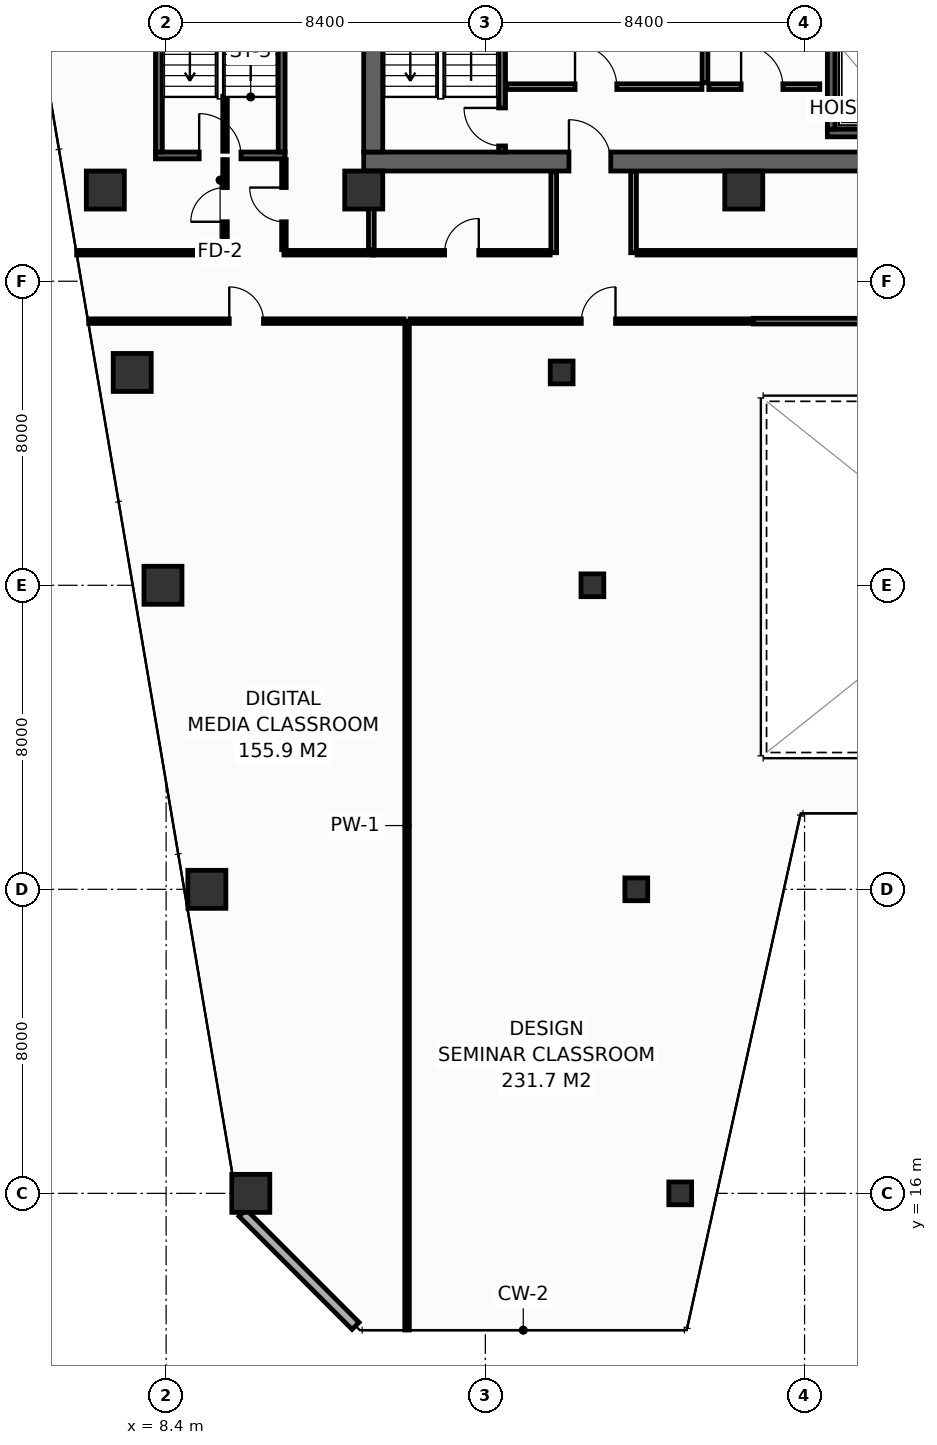
"""IFC4 building model, lengths in metres.
Left out: names, types, materials, properties, quantities, classifications, styles, units other than length and angle.
Written with IfcOpenShell. Run it as: python <this file> out.ifc"""

import sys

from ifc_helpers import new_model, si_unit, direction, frame, frame_2d, origin, origin_2d, place, context, subcontext, project, spatial, rectangle, hollow_rectangle, extrude, element, fill, save


model = new_model("IFC4")
c1 = context("Model", 3, precision=1e-05, world=origin(), true_north=direction((0.0, 1.0)))
c2 = subcontext(c1, "Body", "Model", "MODEL_VIEW")
j1 = project(units=[si_unit("LENGTHUNIT", "METRE"), si_unit("PLANEANGLEUNIT", "RADIAN")], contexts=[c1])
p1 = place(None, origin())
s1 = spatial("IfcSite", under=j1, at=p1, CompositionType="ELEMENT")
p2 = place(p1, origin())
s2 = spatial("IfcBuilding", under=s1, at=p2, CompositionType="ELEMENT")
p3 = place(p2, frame((0.0, 0.0, 175.2)))
s3 = spatial("IfcBuildingStorey", under=s2, at=p3, CompositionType="ELEMENT", Elevation=175.2)
p4 = place(p3, frame((13.6, 43.15, 0.0), z_axis=(0.0, 0.0, 1.0), x_axis=(1.0, 0.0, 0.0)))
e1 = element("IfcWall", 1, at=p4, inside=s3, PredefinedType="SHEAR", context=c2, shape_type="SweptSolid", body=[
    extrude(rectangle(XDim=32.7, YDim=0.5, at=frame_2d((16.35, 0.0))), origin(), (0.0, 0.0, 1.0), 3.55),
])
p5 = place(p4, frame((5.4, 0.0, 0.0)))
e2 = element("IfcOpeningElement", 2, at=p5, cuts=e1, PredefinedType="OPENING", context=c2, shape_type="SweptSolid", body=[
    extrude(rectangle(XDim=1.1, YDim=2.15, at=frame_2d((0.55, 1.075))), frame((0.0, 0.26, 0.0), z_axis=(0.0, -1.0, 0.0), x_axis=(1.0, 0.0, 0.0)), (0.0, 0.0, 1.0), 0.52),
])
p6 = place(p4, frame((25.6, 0.0, 0.0)))
e3 = element("IfcOpeningElement", 3, at=p6, cuts=e1, PredefinedType="OPENING", context=c2, shape_type="SweptSolid", body=[
    extrude(rectangle(XDim=1.1, YDim=2.15, at=frame_2d((0.55, 1.075))), frame((0.0, 0.26, 0.0), z_axis=(0.0, -1.0, 0.0), x_axis=(1.0, 0.0, 0.0)), (0.0, 0.0, 1.0), 0.52),
])
p7 = place(p3, frame((13.85, 43.4, 0.0), z_axis=(0.0, 0.0, 1.0), x_axis=(0.0, 1.0, 0.0)))
e4 = element("IfcWall", 4, at=p7, inside=s3, PredefinedType="SHEAR", context=c2, shape_type="SweptSolid", body=[
    extrude(rectangle(XDim=10.4, YDim=0.5, at=frame_2d((5.2, 0.0))), origin(), (0.0, 0.0, 1.0), 3.55),
])
for number, where, z_axis, x_axis in (
    (5, (6.8, 42.4, 0.0), (0.0, 0.0, 1.0), (1.0, 0.0, 0.0)),
    (6, (13.6, 42.4, 0.0), (0.0, 0.0, 1.0), (1.0, 0.0, 0.0)),
    (7, (23.6, 42.4, 0.0), (0.0, 0.0, 1.0), (1.0, 0.0, 0.0)),
    (8, (10.628, 16.0, 0.0), (0.0, 0.0, 1.0), (1.0, 0.0, 0.0)),
):
    element("IfcColumn", number, at=place(p3, frame(where, z_axis=z_axis, x_axis=x_axis)), inside=s3, PredefinedType="COLUMN", context=c2, shape_type="SweptSolid", body=[
        extrude(hollow_rectangle(XDim=1.0, YDim=1.0, WallThickness=0.045, at=origin_2d()), origin(), (0.0, 0.0, 1.0), 3.8),
    ])
p8 = place(p3, frame((21.928, 16.0, 0.0), z_axis=(0.0, 0.0, 1.0), x_axis=(1.0, 0.0, 0.0)))
e9 = element("IfcColumn", 9, at=p8, inside=s3, PredefinedType="COLUMN", context=c2, shape_type="SweptSolid", body=[
    extrude(hollow_rectangle(XDim=0.6, YDim=0.6, WallThickness=0.028, at=origin_2d()), origin(), (0.0, 0.0, 1.0), 3.8),
])
p9 = place(p3, frame((9.472, 24.0, 0.0), z_axis=(0.0, 0.0, 1.0), x_axis=(1.0, 0.0, 0.0)))
e10 = element("IfcColumn", 10, at=p9, inside=s3, PredefinedType="COLUMN", context=c2, shape_type="SweptSolid", body=[
    extrude(hollow_rectangle(XDim=1.0, YDim=1.0, WallThickness=0.045, at=origin_2d()), origin(), (0.0, 0.0, 1.0), 3.8),
])
p10 = place(p3, frame((20.772, 24.0, 0.0), z_axis=(0.0, 0.0, 1.0), x_axis=(1.0, 0.0, 0.0)))
e11 = element("IfcColumn", 11, at=p10, inside=s3, PredefinedType="COLUMN", context=c2, shape_type="SweptSolid", body=[
    extrude(hollow_rectangle(XDim=0.6, YDim=0.6, WallThickness=0.028, at=origin_2d()), origin(), (0.0, 0.0, 1.0), 3.8),
])
p11 = place(p3, frame((8.317, 32.0, 0.0), z_axis=(0.0, 0.0, 1.0), x_axis=(1.0, 0.0, 0.0)))
e12 = element("IfcColumn", 12, at=p11, inside=s3, PredefinedType="COLUMN", context=c2, shape_type="SweptSolid", body=[
    extrude(hollow_rectangle(XDim=1.0, YDim=1.0, WallThickness=0.045, at=origin_2d()), origin(), (0.0, 0.0, 1.0), 3.8),
])
p12 = place(p3, frame((19.617, 32.0, 0.0), z_axis=(0.0, 0.0, 1.0), x_axis=(1.0, 0.0, 0.0)))
e13 = element("IfcColumn", 13, at=p12, inside=s3, PredefinedType="COLUMN", context=c2, shape_type="SweptSolid", body=[
    extrude(hollow_rectangle(XDim=0.6, YDim=0.6, WallThickness=0.028, at=origin_2d()), origin(), (0.0, 0.0, 1.0), 3.8),
])
p13 = place(p3, frame((7.508, 37.6, 0.0), z_axis=(0.0, 0.0, 1.0), x_axis=(1.0, 0.0, 0.0)))
e14 = element("IfcColumn", 14, at=p13, inside=s3, PredefinedType="COLUMN", context=c2, shape_type="SweptSolid", body=[
    extrude(hollow_rectangle(XDim=1.0, YDim=1.0, WallThickness=0.045, at=origin_2d()), origin(), (0.0, 0.0, 1.0), 3.8),
])
p14 = place(p3, frame((18.808, 37.6, 0.0), z_axis=(0.0, 0.0, 1.0), x_axis=(1.0, 0.0, 0.0)))
e15 = element("IfcColumn", 15, at=p14, inside=s3, PredefinedType="COLUMN", context=c2, shape_type="SweptSolid", body=[
    extrude(hollow_rectangle(XDim=0.6, YDim=0.6, WallThickness=0.028, at=origin_2d()), origin(), (0.0, 0.0, 1.0), 3.8),
])
p15 = place(p3, frame((25.8, 43.9, 0.0), z_axis=(0.0, 0.0, 1.0), x_axis=(1.0, 0.0, 0.0)))
e16 = element("IfcWall", 16, at=p15, inside=s3, PredefinedType="SHEAR", context=c2, shape_type="SweptSolid", body=[
    extrude(rectangle(XDim=2.575, YDim=0.2, at=frame_2d((1.288, 0.0))), origin(), (0.0, 0.0, 1.0), 3.55),
])
p16 = place(p3, frame((25.9, 44.0, 0.0), z_axis=(0.0, 0.0, 1.0), x_axis=(0.0, 1.0, 0.0)))
e17 = element("IfcWall", 17, at=p16, inside=s3, PredefinedType="SHEAR", context=c2, shape_type="SweptSolid", body=[
    extrude(rectangle(XDim=2.3, YDim=0.2, at=frame_2d((1.15, 0.0))), origin(), (0.0, 0.0, 1.0), 3.55),
])
p17 = place(p3, frame((17.24, 43.4, 0.0), z_axis=(0.0, 0.0, 1.0), x_axis=(0.0, 1.0, 0.0)))
e18 = element("IfcWall", 18, at=p17, inside=s3, PredefinedType="SHEAR", context=c2, shape_type="SweptSolid", body=[
    extrude(rectangle(XDim=10.4, YDim=0.18, at=frame_2d((5.2, 0.0))), origin(), (0.0, 0.0, 1.0), 3.55),
])
p18 = place(p17, frame((0.16, 0.0, 0.0)))
e19 = element("IfcOpeningElement", 19, at=p18, cuts=e18, PredefinedType="OPENING", context=c2, shape_type="SweptSolid", body=[
    extrude(rectangle(XDim=1.0, YDim=2.15, at=frame_2d((0.5, 1.075))), frame((0.0, 0.1, 0.0), z_axis=(0.0, -1.0, 0.0), x_axis=(1.0, 0.0, 0.0)), (0.0, 0.0, 1.0), 0.2),
])
p19 = place(p3, frame((8.12, 43.31, 0.0), z_axis=(0.0, 0.0, 1.0), x_axis=(1.0, 0.0, 0.0)))
e20 = element("IfcWall", 20, at=p19, inside=s3, PredefinedType="SHEAR", context=c2, shape_type="SweptSolid", body=[
    extrude(rectangle(XDim=3.41, YDim=0.18, at=frame_2d((1.705, 0.0))), origin(), (0.0, 0.0, 1.0), 3.55),
])
p20 = place(p19, frame((1.15, 0.0, 0.0)))
e21 = element("IfcOpeningElement", 21, at=p20, cuts=e20, PredefinedType="OPENING", context=c2, shape_type="SweptSolid", body=[
    extrude(rectangle(XDim=1.1, YDim=2.15, at=frame_2d((0.55, 1.075))), frame((0.0, 0.1, 0.0), z_axis=(0.0, -1.0, 0.0), x_axis=(1.0, 0.0, 0.0)), (0.0, 0.0, 1.0), 0.2),
])
for number, where, z_axis, x_axis in (
    (22, (11.44, 43.4, 0.0), (0.0, 0.0, 1.0), (0.0, 1.0, 0.0)),
    (23, (8.21, 53.8, 0.0), (0.0, 0.0, 1.0), (0.0, -1.0, 0.0)),
):
    element("IfcWall", number, at=place(p3, frame(where, z_axis=z_axis, x_axis=x_axis)), inside=s3, PredefinedType="SHEAR", context=c2, shape_type="SweptSolid", body=[
        extrude(rectangle(XDim=10.4, YDim=0.18, at=frame_2d((5.2, 0.0))), origin(), (0.0, 0.0, 1.0), 3.55),
    ])
p21 = place(p3, frame((17.36, 45.12, 0.0), z_axis=(0.0, 0.0, 1.0), x_axis=(1.0, 0.0, 0.0)))
e24 = element("IfcWall", 24, at=p21, inside=s3, PredefinedType="PARTITIONING", context=c2, shape_type="SweptSolid", body=[
    extrude(rectangle(XDim=5.14, YDim=0.15, at=frame_2d((2.57, 0.0))), origin(), (0.0, 0.0, 1.0), 3.55),
])
p22 = place(p21, frame((1.8, 0.0, 0.0)))
e25 = element("IfcOpeningElement", 25, at=p22, cuts=e24, PredefinedType="OPENING", context=c2, shape_type="SweptSolid", body=[
    extrude(rectangle(XDim=1.1, YDim=2.15, at=frame_2d((0.55, 1.075))), frame((0.0, 0.085, 0.0), z_axis=(0.0, -1.0, 0.0), x_axis=(1.0, 0.0, 0.0)), (0.0, 0.0, 1.0), 0.17),
])
p23 = place(p3, frame((22.58, 50.55, 0.0), z_axis=(0.0, 0.0, 1.0), x_axis=(0.0, -1.0, 0.0)))
e26 = element("IfcWall", 26, at=p23, inside=s3, PredefinedType="PARTITIONING", context=c2, shape_type="SweptSolid", body=[
    extrude(rectangle(XDim=5.33, YDim=0.15, at=frame_2d((2.665, 0.0))), origin(), (0.0, 0.0, 1.0), 3.55),
])
p24 = place(p23, frame((1.8, 0.0, 0.0)))
e27 = element("IfcOpeningElement", 27, at=p24, cuts=e26, PredefinedType="OPENING", context=c2, shape_type="SweptSolid", body=[
    extrude(rectangle(XDim=1.1, YDim=2.15, at=frame_2d((0.55, 1.075))), frame((0.0, 0.085, 0.0), z_axis=(0.0, -1.0, 0.0), x_axis=(1.0, 0.0, 0.0)), (0.0, 0.0, 1.0), 0.17),
])
p25 = place(p3, frame((22.68, 45.12, 0.0), z_axis=(0.0, 0.0, 1.0), x_axis=(1.0, 0.0, 0.0)))
e28 = element("IfcWall", 28, at=p25, inside=s3, PredefinedType="PARTITIONING", context=c2, shape_type="SweptSolid", body=[
    extrude(rectangle(XDim=2.92, YDim=0.15, at=frame_2d((1.46, 0.0))), origin(), (0.0, 0.0, 1.0), 3.55),
])
p26 = place(p25, frame((0.85, 0.0, 0.0)))
e29 = element("IfcOpeningElement", 29, at=p26, cuts=e28, PredefinedType="OPENING", context=c2, shape_type="SweptSolid", body=[
    extrude(rectangle(XDim=1.1, YDim=2.15, at=frame_2d((0.55, 1.075))), frame((0.0, 0.085, 0.0), z_axis=(0.0, -1.0, 0.0), x_axis=(1.0, 0.0, 0.0)), (0.0, 0.0, 1.0), 0.17),
])
p27 = place(p3, frame((10.411, 15.487, 0.0), z_axis=(0.0, 0.0, 1.0), x_axis=(0.707135806771, -0.70707775441, 0.0)))
e30 = element("IfcWall", 30, at=p27, inside=s3, PredefinedType="STANDARD", context=c2, shape_type="SweptSolid", body=[
    extrude(rectangle(XDim=4.206, YDim=0.26, at=frame_2d((2.103, 0.0))), origin(), (0.0, 0.0, 1.0), 3.55),
])
p28 = place(p3, frame((6.045, 40.75, 0.0), z_axis=(0.0, 0.0, 1.0), x_axis=(1.0, 0.0, 0.0)))
e31 = element("IfcWall", 31, at=p28, inside=s3, PredefinedType="PARTITIONING", context=c2, shape_type="SweptSolid", body=[
    extrude(rectangle(XDim=3.905, YDim=0.12, at=frame_2d((1.952, 0.0))), origin(), (0.0, 0.0, 1.0), 3.035),
])
p29 = place(p3, frame((11.5, 40.75, 0.0), z_axis=(0.0, 0.0, 1.0), x_axis=(1.0, 0.0, 0.0)))
e32 = element("IfcWall", 32, at=p29, inside=s3, PredefinedType="PARTITIONING", context=c2, shape_type="SweptSolid", body=[
    extrude(rectangle(XDim=2.35, YDim=0.12, at=frame_2d((1.175, 0.0))), origin(), (0.0, 0.0, 1.0), 3.55),
])
p30 = place(p3, frame((9.95, 40.83, 0.0), z_axis=(0.0, 0.0, 1.0), x_axis=(0.0, 1.0, 0.0)))
e33 = element("IfcWall", 33, at=p30, inside=s3, PredefinedType="PARTITIONING", context=c2, shape_type="SweptSolid", body=[
    extrude(rectangle(XDim=2.37, YDim=0.12, at=frame_2d((1.185, 0.0))), origin(), (0.0, 0.0, 1.0), 2.835),
])
p31 = place(p30, frame((0.735, 0.0, 0.0)))
e34 = element("IfcOpeningElement", 34, at=p31, cuts=e33, PredefinedType="OPENING", context=c2, shape_type="SweptSolid", body=[
    extrude(rectangle(XDim=0.9, YDim=2.1, at=frame_2d((0.45, 1.05))), frame((0.0, 0.07, 0.0), z_axis=(0.0, -1.0, 0.0), x_axis=(1.0, 0.0, 0.0)), (0.0, 0.0, 1.0), 0.14),
])
p32 = place(p3, frame((9.95, 43.42, 0.0), z_axis=(0.0, 0.0, 1.0), x_axis=(0.0, 1.0, 0.0)))
e35 = element("IfcWall", 35, at=p32, inside=s3, PredefinedType="PARTITIONING", context=c2, shape_type="SweptSolid", body=[
    extrude(rectangle(XDim=1.45, YDim=0.12, at=frame_2d((0.725, 0.0))), origin(), (0.0, 0.0, 1.0), 3.55),
])
p33 = place(p3, frame((11.5, 40.83, 0.0), z_axis=(0.0, 0.0, 1.0), x_axis=(0.0, 1.0, 0.0)))
e36 = element("IfcWall", 36, at=p33, inside=s3, PredefinedType="PARTITIONING", context=c2, shape_type="SweptSolid", body=[
    extrude(rectangle(XDim=2.37, YDim=0.12, at=frame_2d((1.185, 0.0))), origin(), (0.0, 0.0, 1.0), 2.835),
])
p34 = place(p33, frame((0.735, 0.0, 0.0)))
e37 = element("IfcOpeningElement", 37, at=p34, cuts=e36, PredefinedType="OPENING", context=c2, shape_type="SweptSolid", body=[
    extrude(rectangle(XDim=0.9, YDim=2.1, at=frame_2d((0.45, 1.05))), frame((0.0, 0.07, 0.0), z_axis=(0.0, -1.0, 0.0), x_axis=(1.0, 0.0, 0.0)), (0.0, 0.0, 1.0), 0.14),
])
p35 = place(p3, frame((13.8, 40.83, 0.0), z_axis=(0.0, 0.0, 1.0), x_axis=(0.0, 1.0, 0.0)))
e38 = element("IfcWall", 38, at=p35, inside=s3, PredefinedType="PARTITIONING", context=c2, shape_type="SweptSolid", body=[
    extrude(rectangle(XDim=2.05, YDim=0.15, at=frame_2d((1.025, 0.0))), origin(), (0.0, 0.0, 1.0), 3.55),
])
for number, where, z_axis, x_axis in (
    (39, (18.6, 40.75, 0.0), (0.0, 0.0, 1.0), (0.0, 1.0, 0.0)),
    (40, (20.7, 40.75, 0.0), (0.0, 0.0, 1.0), (0.0, 1.0, 0.0)),
):
    element("IfcWall", number, at=place(p3, frame(where, z_axis=z_axis, x_axis=x_axis)), inside=s3, PredefinedType="PARTITIONING", context=c2, shape_type="SweptSolid", body=[
        extrude(rectangle(XDim=2.13, YDim=0.15, at=frame_2d((1.065, 0.0))), origin(), (0.0, 0.0, 1.0), 3.55),
    ])
p36 = place(p3, frame((13.85, 40.75, 0.0), z_axis=(0.0, 0.0, 1.0), x_axis=(1.0, 0.0, 0.0)))
e41 = element("IfcWall", 41, at=p36, inside=s3, PredefinedType="PARTITIONING", context=c2, shape_type="SweptSolid", body=[
    extrude(rectangle(XDim=4.655, YDim=0.12, at=frame_2d((2.327, 0.0))), origin(), (0.0, 0.0, 1.0), 3.55),
])
p37 = place(p36, frame((1.877, 0.0, 0.0)))
e42 = element("IfcOpeningElement", 42, at=p37, cuts=e41, PredefinedType="OPENING", context=c2, shape_type="SweptSolid", body=[
    extrude(rectangle(XDim=0.9, YDim=2.1, at=frame_2d((0.45, 1.05))), frame((0.0, 0.07, 0.0), z_axis=(0.0, -1.0, 0.0), x_axis=(1.0, 0.0, 0.0)), (0.0, 0.0, 1.0), 0.14),
])
p38 = place(p3, frame((20.795, 40.75, 0.0), z_axis=(0.0, 0.0, 1.0), x_axis=(1.0, 0.0, 0.0)))
e43 = element("IfcWall", 43, at=p38, inside=s3, PredefinedType="PARTITIONING", context=c2, shape_type="SweptSolid", body=[
    extrude(rectangle(XDim=17.91, YDim=0.12, at=frame_2d((8.955, 0.0))), origin(), (0.0, 0.0, 1.0), 2.835),
])
p39 = place(p38, frame((8.505, 0.0, 0.0)))
e44 = element("IfcOpeningElement", 44, at=p39, cuts=e43, PredefinedType="OPENING", context=c2, shape_type="SweptSolid", body=[
    extrude(rectangle(XDim=0.9, YDim=2.1, at=frame_2d((0.45, 1.05))), frame((0.0, 0.07, 0.0), z_axis=(0.0, -1.0, 0.0), x_axis=(1.0, 0.0, 0.0)), (0.0, 0.0, 1.0), 0.14),
])
p40 = place(p3, frame((14.74, 12.405, 0.0), z_axis=(0.0, 0.0, 1.0), x_axis=(0.0, 1.0, 0.0)))
e45 = element("IfcWall", 45, at=p40, inside=s3, PredefinedType="PARTITIONING", context=c2, shape_type="SweptSolid", body=[
    extrude(rectangle(XDim=26.545, YDim=0.12, at=frame_2d((13.272, 0.0))), origin(), (0.0, 0.0, 1.0), 2.835),
])
p41 = place(p3, frame((6.363, 38.95, 0.0), z_axis=(0.0, 0.0, 1.0), x_axis=(1.0, 0.0, 0.0)))
e46 = element("IfcWall", 46, at=p41, inside=s3, PredefinedType="PARTITIONING", context=c2, shape_type="SweptSolid", body=[
    extrude(rectangle(XDim=8.297, YDim=0.12, at=frame_2d((4.148, 0.0))), origin(), (0.0, 0.0, 1.0), 3.035),
])
p42 = place(p41, frame((3.699, 0.0, 0.0)))
e47 = element("IfcOpeningElement", 47, at=p42, cuts=e46, PredefinedType="OPENING", context=c2, shape_type="SweptSolid", body=[
    extrude(rectangle(XDim=0.9, YDim=2.1, at=frame_2d((0.45, 1.05))), frame((0.0, 0.07, 0.0), z_axis=(0.0, -1.0, 0.0), x_axis=(1.0, 0.0, 0.0)), (0.0, 0.0, 1.0), 0.14),
])
p43 = place(p3, frame((14.82, 38.95, 0.0), z_axis=(0.0, 0.0, 1.0), x_axis=(1.0, 0.0, 0.0)))
e48 = element("IfcWall", 48, at=p43, inside=s3, PredefinedType="PARTITIONING", context=c2, shape_type="SweptSolid", body=[
    extrude(rectangle(XDim=9.03, YDim=0.12, at=frame_2d((4.515, 0.0))), origin(), (0.0, 0.0, 1.0), 2.835),
])
p44 = place(p43, frame((4.505, 0.0, 0.0)))
e49 = element("IfcOpeningElement", 49, at=p44, cuts=e48, PredefinedType="OPENING", context=c2, shape_type="SweptSolid", body=[
    extrude(rectangle(XDim=0.9, YDim=2.1, at=frame_2d((0.45, 1.05))), frame((0.0, 0.07, 0.0), z_axis=(0.0, -1.0, 0.0), x_axis=(1.0, 0.0, 0.0)), (0.0, 0.0, 1.0), 0.14),
])
p45 = place(p3, frame((23.85, 38.95, 0.0), z_axis=(0.0, 0.0, 1.0), x_axis=(1.0, 0.0, 0.0)))
e50 = element("IfcWall", 50, at=p45, inside=s3, PredefinedType="PARTITIONING", context=c2, shape_type="SweptSolid", body=[
    extrude(rectangle(XDim=12.3, YDim=0.15, at=frame_2d((6.15, 0.0))), origin(), (0.0, 0.0, 1.0), 3.55),
])
p46 = place(p18, origin())
e51 = element("IfcDoor", 51, at=p46, inside=s3, OperationType="SINGLE_SWING_RIGHT", PredefinedType="DOOR", context=c2, shape_type="SweptSolid", body=[
    extrude(rectangle(XDim=1.0, YDim=2.15, at=frame_2d((0.5, 1.075))), frame((0.0, 0.025, 0.0), z_axis=(0.0, -1.0, 0.0), x_axis=(1.0, 0.0, 0.0)), (0.0, 0.0, 1.0), 0.05),
])
fill(e19, e51)
p47 = place(p20, origin())
e52 = element("IfcDoor", 52, at=p47, inside=s3, OperationType="SINGLE_SWING_LEFT", PredefinedType="DOOR", context=c2, shape_type="SweptSolid", body=[
    extrude(rectangle(XDim=1.1, YDim=2.15, at=frame_2d((0.55, 1.075))), frame((0.0, 0.025, 0.0), z_axis=(0.0, -1.0, 0.0), x_axis=(1.0, 0.0, 0.0)), (0.0, 0.0, 1.0), 0.05),
])
fill(e21, e52)
p48 = place(p22, origin())
e53 = element("IfcDoor", 53, at=p48, inside=s3, OperationType="SINGLE_SWING_LEFT", PredefinedType="DOOR", context=c2, shape_type="SweptSolid", body=[
    extrude(rectangle(XDim=1.1, YDim=2.15, at=frame_2d((0.55, 1.075))), frame((0.0, 0.025, 0.0), z_axis=(0.0, -1.0, 0.0), x_axis=(1.0, 0.0, 0.0)), (0.0, 0.0, 1.0), 0.05),
])
fill(e25, e53)
p49 = place(p26, origin())
e54 = element("IfcDoor", 54, at=p49, inside=s3, OperationType="SINGLE_SWING_LEFT", PredefinedType="DOOR", context=c2, shape_type="SweptSolid", body=[
    extrude(rectangle(XDim=1.1, YDim=2.15, at=frame_2d((0.55, 1.075))), frame((0.0, 0.025, 0.0), z_axis=(0.0, -1.0, 0.0), x_axis=(1.0, 0.0, 0.0)), (0.0, 0.0, 1.0), 0.05),
])
fill(e29, e54)
p50 = place(p5, origin())
e55 = element("IfcDoor", 55, at=p50, inside=s3, OperationType="SINGLE_SWING_LEFT", PredefinedType="DOOR", context=c2, shape_type="SweptSolid", body=[
    extrude(rectangle(XDim=1.1, YDim=2.15, at=frame_2d((0.55, 1.075))), frame((0.0, 0.025, 0.0), z_axis=(0.0, -1.0, 0.0), x_axis=(1.0, 0.0, 0.0)), (0.0, 0.0, 1.0), 0.05),
])
fill(e2, e55)
p51 = place(p31, origin())
e56 = element("IfcDoor", 56, at=p51, inside=s3, OperationType="SINGLE_SWING_LEFT", PredefinedType="DOOR", context=c2, shape_type="SweptSolid", body=[
    extrude(rectangle(XDim=0.9, YDim=2.1, at=frame_2d((0.45, 1.05))), frame((0.0, 0.025, 0.0), z_axis=(0.0, -1.0, 0.0), x_axis=(1.0, 0.0, 0.0)), (0.0, 0.0, 1.0), 0.05),
])
fill(e34, e56)
p52 = place(p34, origin())
e57 = element("IfcDoor", 57, at=p52, inside=s3, OperationType="SINGLE_SWING_RIGHT", PredefinedType="DOOR", context=c2, shape_type="SweptSolid", body=[
    extrude(rectangle(XDim=0.9, YDim=2.1, at=frame_2d((0.45, 1.05))), frame((0.0, 0.025, 0.0), z_axis=(0.0, -1.0, 0.0), x_axis=(1.0, 0.0, 0.0)), (0.0, 0.0, 1.0), 0.05),
])
fill(e37, e57)
p53 = place(p37, origin())
e58 = element("IfcDoor", 58, at=p53, inside=s3, OperationType="SINGLE_SWING_RIGHT", PredefinedType="DOOR", context=c2, shape_type="SweptSolid", body=[
    extrude(rectangle(XDim=0.9, YDim=2.1, at=frame_2d((0.45, 1.05))), frame((0.0, 0.025, 0.0), z_axis=(0.0, -1.0, 0.0), x_axis=(1.0, 0.0, 0.0)), (0.0, 0.0, 1.0), 0.05),
])
fill(e42, e58)
p54 = place(p42, origin())
e59 = element("IfcDoor", 59, at=p54, inside=s3, OperationType="SINGLE_SWING_LEFT", PredefinedType="DOOR", context=c2, shape_type="SweptSolid", body=[
    extrude(rectangle(XDim=0.9, YDim=2.1, at=frame_2d((0.45, 1.05))), frame((0.0, 0.025, 0.0), z_axis=(0.0, -1.0, 0.0), x_axis=(1.0, 0.0, 0.0)), (0.0, 0.0, 1.0), 0.05),
])
fill(e47, e59)
p55 = place(p44, origin())
e60 = element("IfcDoor", 60, at=p55, inside=s3, OperationType="SINGLE_SWING_RIGHT", PredefinedType="DOOR", context=c2, shape_type="SweptSolid", body=[
    extrude(rectangle(XDim=0.9, YDim=2.1, at=frame_2d((0.45, 1.05))), frame((0.0, 0.025, 0.0), z_axis=(0.0, -1.0, 0.0), x_axis=(1.0, 0.0, 0.0)), (0.0, 0.0, 1.0), 0.05),
])
fill(e49, e60)
save(model, sys.argv[1])
